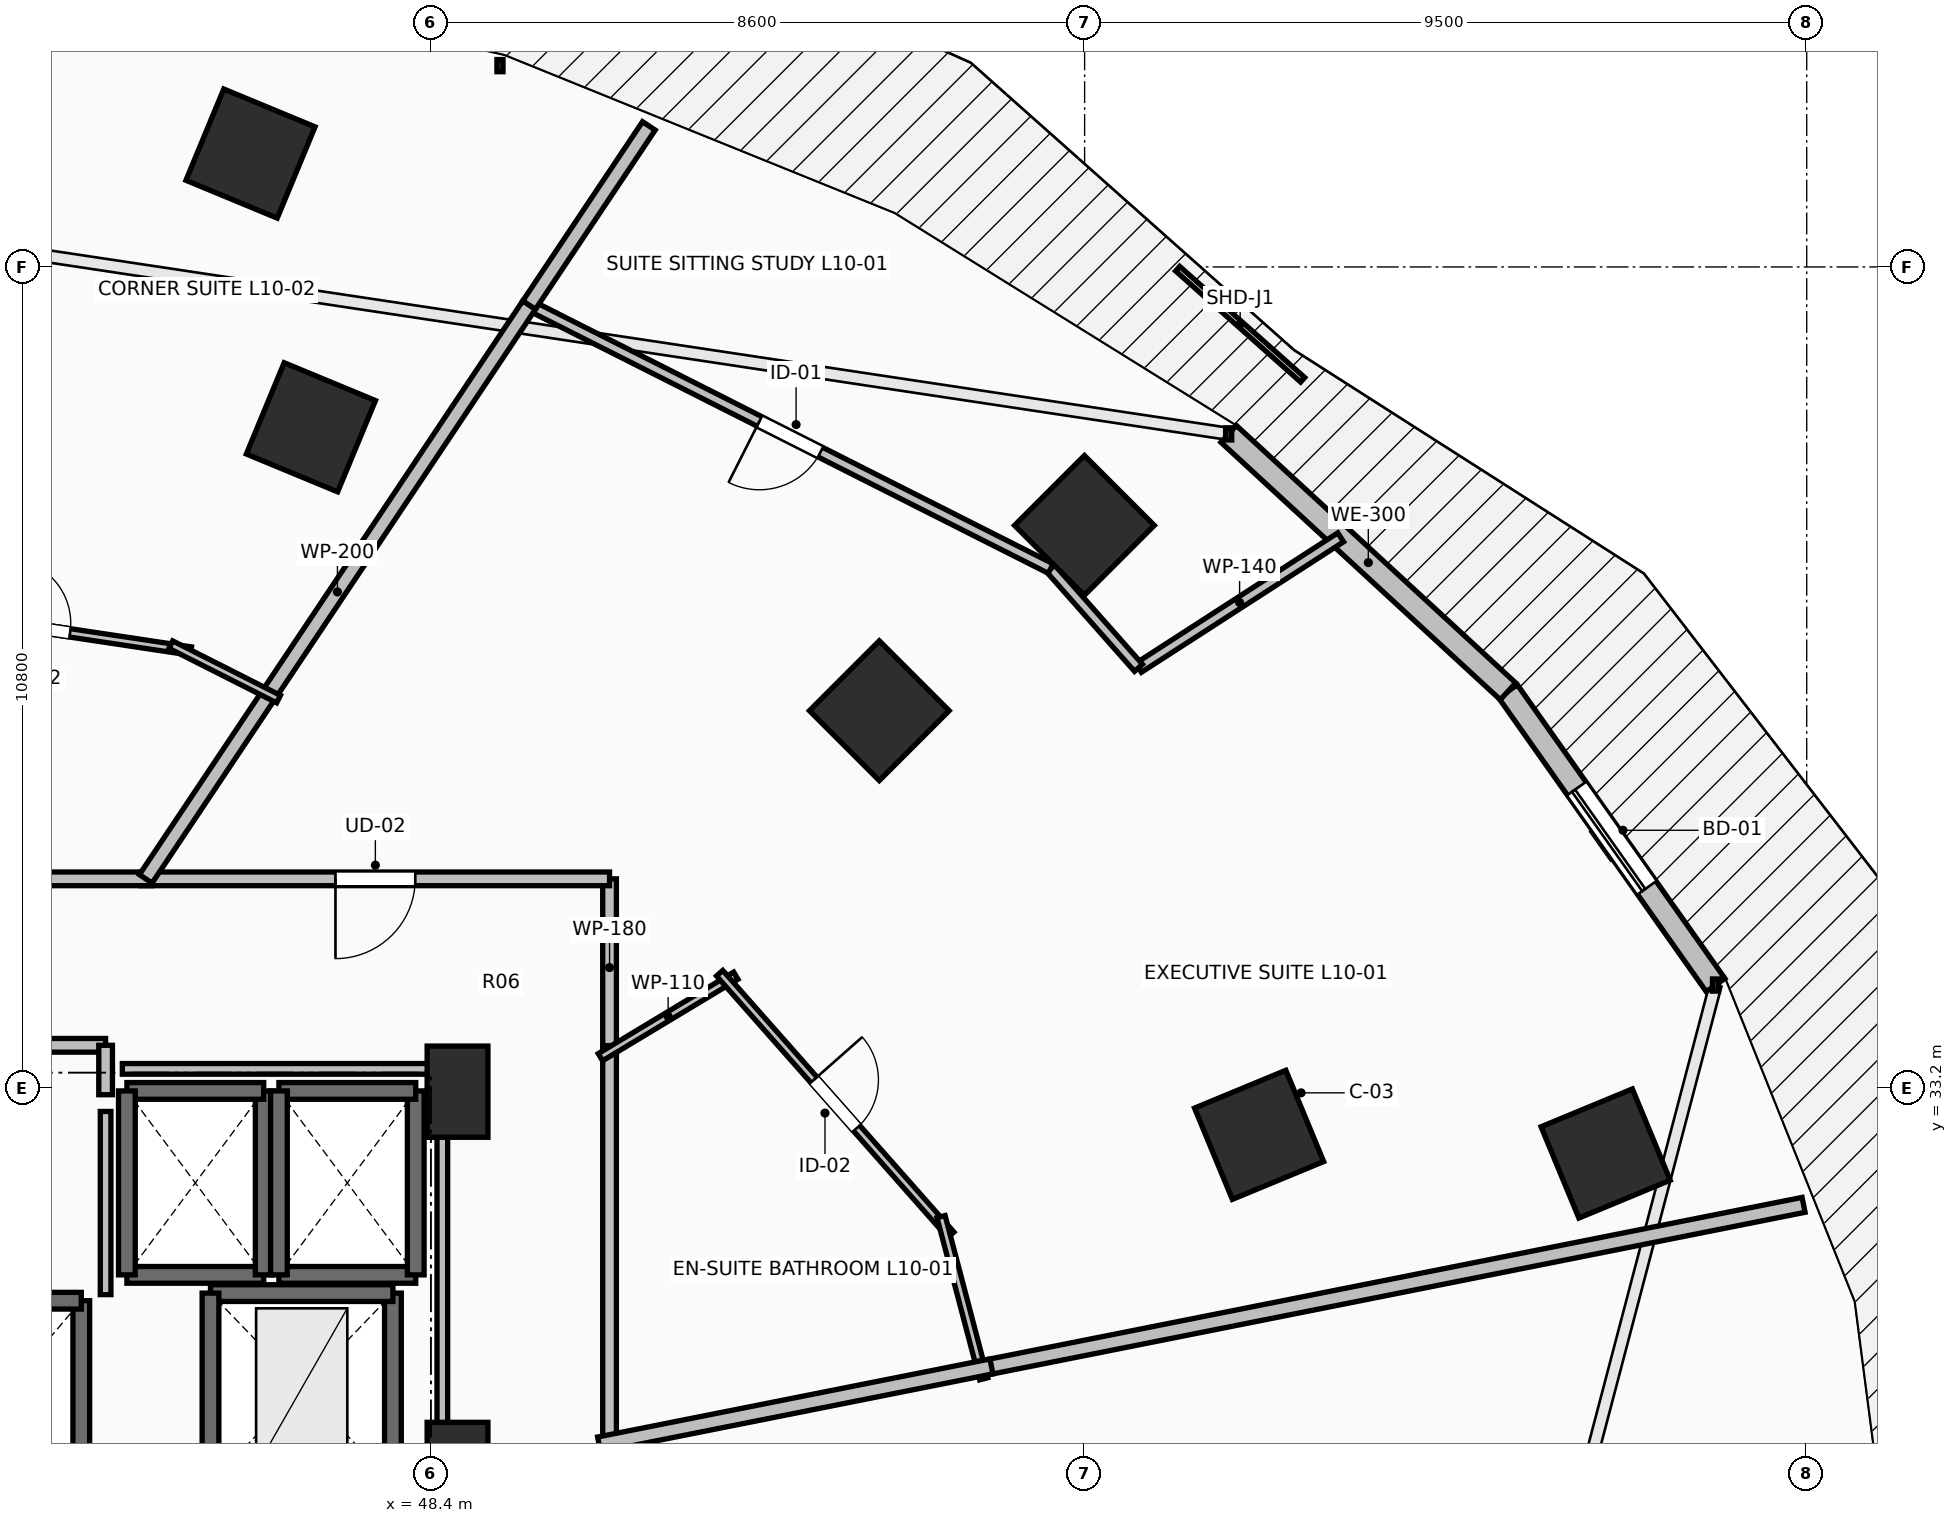
"""IFC4 building model, lengths in metres.
Left out: names, types, materials, properties, quantities, classifications, styles, units other than length and angle.
Written with IfcOpenShell. Run it as: python <this file> out.ifc"""

import sys

from ifc_helpers import new_model, si_unit, direction, frame, frame_2d, origin, origin_2d, place, context, subcontext, project, spatial, rectangle, extrude, element, fill, save


model = new_model("IFC4")
c1 = context("Model", 3, precision=1e-05, world=origin(), true_north=direction((0.0, 1.0)))
c2 = subcontext(c1, "Body", "Model", "MODEL_VIEW")
j1 = project(units=[si_unit("LENGTHUNIT", "METRE"), si_unit("PLANEANGLEUNIT", "RADIAN")], contexts=[c1])
p1 = place(None, origin())
s1 = spatial("IfcSite", under=j1, at=p1, CompositionType="ELEMENT")
p2 = place(p1, origin())
s2 = spatial("IfcBuilding", under=s1, at=p2, CompositionType="ELEMENT")
p3 = place(p2, frame((0.0, 0.0, 41.5)))
s3 = spatial("IfcBuildingStorey", under=s2, at=p3, CompositionType="ELEMENT", Elevation=41.5)
for number, where, z_axis, x_axis in (
    (1, (59.295, 32.582, 0.0), (0.0, 0.0, 1.0), (0.924, 0.383, 0.0)),
    (2, (54.299, 38.162, 0.0), (0.0, 0.0, 1.0), (0.707, 0.707, 0.0)),
    (3, (46.821, 41.891, 0.0), (0.0, 0.0, 1.0), (0.383, 0.924, 0.0)),
    (4, (63.854, 32.337, 0.0), (0.0, 0.0, 1.0), (0.924, 0.383, 0.0)),
    (5, (56.997, 40.6, 0.0), (0.0, 0.0, 1.0), (0.707, 0.707, 0.0)),
    (6, (46.026, 45.492, 0.0), (0.0, 0.0, 1.0), (0.383, 0.924, 0.0)),
):
    element("IfcColumn", number, at=place(p3, frame(where, z_axis=z_axis, x_axis=x_axis)), inside=s3, PredefinedType="COLUMN", context=c2, shape_type="SweptSolid", body=[
        extrude(rectangle(XDim=1.3, YDim=1.3, at=origin_2d()), origin(), (0.0, 0.0, 1.0), 3.5),
    ])
for number, where, z_axis, x_axis in (
    (7, (48.75, 33.15, 0.0), (0.0, 0.0, 1.0), (1.0, 0.0, 0.0)),
    (8, (48.75, 28.2, 0.0), (0.0, 0.0, 1.0), (1.0, 0.0, 0.0)),
):
    element("IfcColumn", number, at=place(p3, frame(where, z_axis=z_axis, x_axis=x_axis)), inside=s3, PredefinedType="PILASTER", context=c2, shape_type="SweptSolid", body=[
        extrude(rectangle(XDim=0.8, YDim=1.2, at=origin_2d()), origin(), (0.0, 0.0, 1.0), 3.5),
    ])
p4 = place(p3, frame((65.301, 34.553, 0.0), z_axis=(0.0, 0.0, 1.0), x_axis=(-0.577130815624, 0.816651713803, 0.0)))
e9 = element("IfcWall", 9, at=p4, inside=s3, PredefinedType="STANDARD", context=c2, shape_type="SweptSolid", body=[
    extrude(rectangle(XDim=4.731, YDim=0.3, at=frame_2d((2.366, 0.0))), origin(), (0.0, 0.0, 1.0), 3.24),
])
p5 = place(p4, frame((1.566, 0.0, 0.0)))
e10 = element("IfcOpeningElement", 10, at=p5, cuts=e9, PredefinedType="OPENING", context=c2, shape_type="SweptSolid", body=[
    extrude(rectangle(XDim=1.6, YDim=2.3, at=frame_2d((0.8, 1.15))), frame((0.0, 0.165, 0.0), z_axis=(0.0, -1.0, 0.0), x_axis=(1.0, 0.0, 0.0)), (0.0, 0.0, 1.0), 0.33),
])
p6 = place(p3, frame((62.57, 38.417, 0.0), z_axis=(0.0, 0.0, 1.0), x_axis=(-0.735342629635, 0.677695519419, 0.0)))
e11 = element("IfcWall", 11, at=p6, inside=s3, PredefinedType="STANDARD", context=c2, shape_type="SweptSolid", body=[
    extrude(rectangle(XDim=4.997, YDim=0.3, at=frame_2d((2.499, 0.0))), origin(), (0.0, 0.0, 1.0), 3.24),
])
p7 = place(p3, frame((43.8, 27.8, 0.0), z_axis=(0.0, 0.0, 1.0), x_axis=(0.0, 1.0, 0.0)))
e12 = element("IfcWall", 12, at=p7, inside=s3, PredefinedType="SOLIDWALL", context=c2, shape_type="SweptSolid", body=[
    extrude(rectangle(XDim=2.6, YDim=0.22, at=frame_2d((1.3, 0.0))), origin(), (0.0, 0.0, 1.0), 3.24),
])
p8 = place(p3, frame((43.8, 30.4, 0.0), z_axis=(0.0, 0.0, 1.0), x_axis=(-1.0, 0.0, 0.0)))
e13 = element("IfcWall", 13, at=p8, inside=s3, PredefinedType="SOLIDWALL", context=c2, shape_type="SweptSolid", body=[
    extrude(rectangle(XDim=2.2, YDim=0.22, at=frame_2d((1.1, 0.0))), origin(), (0.0, 0.0, 1.0), 3.24),
])
p9 = place(p3, frame((44.4, 30.74, 0.0), z_axis=(0.0, 0.0, 1.0), x_axis=(1.0, 0.0, 0.0)))
e14 = element("IfcWall", 14, at=p9, inside=s3, PredefinedType="SOLIDWALL", context=c2, shape_type="SweptSolid", body=[
    extrude(rectangle(XDim=1.8, YDim=0.22, at=frame_2d((0.9, 0.0))), origin(), (0.0, 0.0, 1.0), 3.24),
])
p10 = place(p3, frame((46.2, 30.74, 0.0), z_axis=(0.0, 0.0, 1.0), x_axis=(0.0, 1.0, 0.0)))
e15 = element("IfcWall", 15, at=p10, inside=s3, PredefinedType="SOLIDWALL", context=c2, shape_type="SweptSolid", body=[
    extrude(rectangle(XDim=2.42, YDim=0.22, at=frame_2d((1.21, 0.0))), origin(), (0.0, 0.0, 1.0), 3.24),
])
p11 = place(p3, frame((46.2, 33.16, 0.0), z_axis=(0.0, 0.0, 1.0), x_axis=(-1.0, 0.0, 0.0)))
e16 = element("IfcWall", 16, at=p11, inside=s3, PredefinedType="SOLIDWALL", context=c2, shape_type="SweptSolid", body=[
    extrude(rectangle(XDim=1.8, YDim=0.22, at=frame_2d((0.9, 0.0))), origin(), (0.0, 0.0, 1.0), 3.24),
])
p12 = place(p3, frame((44.4, 33.16, 0.0), z_axis=(0.0, 0.0, 1.0), x_axis=(0.0, -1.0, 0.0)))
e17 = element("IfcWall", 17, at=p12, inside=s3, PredefinedType="SOLIDWALL", context=c2, shape_type="SweptSolid", body=[
    extrude(rectangle(XDim=2.42, YDim=0.22, at=frame_2d((1.21, 0.0))), origin(), (0.0, 0.0, 1.0), 3.24),
])
p13 = place(p3, frame((46.4, 30.74, 0.0), z_axis=(0.0, 0.0, 1.0), x_axis=(1.0, 0.0, 0.0)))
e18 = element("IfcWall", 18, at=p13, inside=s3, PredefinedType="SOLIDWALL", context=c2, shape_type="SweptSolid", body=[
    extrude(rectangle(XDim=1.8, YDim=0.22, at=frame_2d((0.9, 0.0))), origin(), (0.0, 0.0, 1.0), 3.24),
])
p14 = place(p3, frame((48.2, 30.74, 0.0), z_axis=(0.0, 0.0, 1.0), x_axis=(0.0, 1.0, 0.0)))
e19 = element("IfcWall", 19, at=p14, inside=s3, PredefinedType="SOLIDWALL", context=c2, shape_type="SweptSolid", body=[
    extrude(rectangle(XDim=2.42, YDim=0.22, at=frame_2d((1.21, 0.0))), origin(), (0.0, 0.0, 1.0), 3.24),
])
p15 = place(p3, frame((48.2, 33.16, 0.0), z_axis=(0.0, 0.0, 1.0), x_axis=(-1.0, 0.0, 0.0)))
e20 = element("IfcWall", 20, at=p15, inside=s3, PredefinedType="SOLIDWALL", context=c2, shape_type="SweptSolid", body=[
    extrude(rectangle(XDim=1.8, YDim=0.22, at=frame_2d((0.9, 0.0))), origin(), (0.0, 0.0, 1.0), 3.24),
])
p16 = place(p3, frame((46.4, 33.16, 0.0), z_axis=(0.0, 0.0, 1.0), x_axis=(0.0, -1.0, 0.0)))
e21 = element("IfcWall", 21, at=p16, inside=s3, PredefinedType="SOLIDWALL", context=c2, shape_type="SweptSolid", body=[
    extrude(rectangle(XDim=2.42, YDim=0.22, at=frame_2d((1.21, 0.0))), origin(), (0.0, 0.0, 1.0), 3.24),
])
p17 = place(p3, frame((47.9, 28.0, 0.0), z_axis=(0.0, 0.0, 1.0), x_axis=(0.0, 1.0, 0.0)))
e22 = element("IfcWall", 22, at=p17, inside=s3, PredefinedType="SHEAR", context=c2, shape_type="SweptSolid", body=[
    extrude(rectangle(XDim=2.5, YDim=0.22, at=frame_2d((1.25, 0.0))), origin(), (0.0, 0.0, 1.0), 3.24),
])
p18 = place(p3, frame((47.9, 30.5, 0.0), z_axis=(0.0, 0.0, 1.0), x_axis=(-1.0, 0.0, 0.0)))
e23 = element("IfcWall", 23, at=p18, inside=s3, PredefinedType="SHEAR", context=c2, shape_type="SweptSolid", body=[
    extrude(rectangle(XDim=2.4, YDim=0.22, at=frame_2d((1.2, 0.0))), origin(), (0.0, 0.0, 1.0), 3.24),
])
p19 = place(p3, frame((45.5, 30.5, 0.0), z_axis=(0.0, 0.0, 1.0), x_axis=(0.0, -1.0, 0.0)))
e24 = element("IfcWall", 24, at=p19, inside=s3, PredefinedType="SHEAR", context=c2, shape_type="SweptSolid", body=[
    extrude(rectangle(XDim=2.5, YDim=0.22, at=frame_2d((1.25, 0.0))), origin(), (0.0, 0.0, 1.0), 3.24),
])
p20 = place(p3, frame((44.12, 33.76, 0.0), z_axis=(0.0, 0.0, 1.0), x_axis=(-1.0, 0.0, 0.0)))
e25 = element("IfcWall", 25, at=p20, inside=s3, PredefinedType="PARTITIONING", context=c2, shape_type="SweptSolid", body=[
    extrude(rectangle(XDim=2.53, YDim=0.18, at=frame_2d((1.265, 0.0))), origin(), (0.0, 0.0, 1.0), 3.24),
])
p21 = place(p20, frame((0.84, 0.0, 0.0)))
e26 = element("IfcOpeningElement", 26, at=p21, cuts=e25, PredefinedType="OPENING", context=c2, shape_type="SweptSolid", body=[
    extrude(rectangle(XDim=0.85, YDim=2.1, at=frame_2d((0.425, 1.05))), frame((0.0, 0.105, 0.0), z_axis=(0.0, -1.0, 0.0), x_axis=(1.0, 0.0, 0.0)), (0.0, 0.0, 1.0), 0.21),
])
p22 = place(p3, frame((44.12, 33.11, 0.0), z_axis=(0.0, 0.0, 1.0), x_axis=(0.0, 1.0, 0.0)))
e27 = element("IfcWall", 27, at=p22, inside=s3, PredefinedType="PARTITIONING", context=c2, shape_type="SweptSolid", body=[
    extrude(rectangle(XDim=0.65, YDim=0.18, at=frame_2d((0.325, 0.0))), origin(), (0.0, 0.0, 1.0), 3.24),
])
p23 = place(p3, frame((50.75, 33.616, 0.0), z_axis=(0.0, 0.0, 1.0), x_axis=(0.0, 1.0, 0.0)))
e28 = element("IfcWall", 28, at=p23, inside=s3, PredefinedType="PARTITIONING", context=c2, shape_type="SweptSolid", body=[
    extrude(rectangle(XDim=2.334, YDim=0.18, at=frame_2d((1.167, 0.0))), origin(), (0.0, 0.0, 1.0), 2.432),
])
p24 = place(p3, frame((50.75, 35.95, 0.0), z_axis=(0.0, 0.0, 1.0), x_axis=(-1.0, 0.0, 0.0)))
e29 = element("IfcWall", 29, at=p24, inside=s3, PredefinedType="PARTITIONING", context=c2, shape_type="SweptSolid", body=[
    extrude(rectangle(XDim=6.162, YDim=0.18, at=frame_2d((3.081, 0.0))), origin(), (0.0, 0.0, 1.0), 2.432),
])
p25 = place(p24, frame((2.556, 0.0, 0.0)))
e30 = element("IfcOpeningElement", 30, at=p25, cuts=e29, PredefinedType="OPENING", context=c2, shape_type="SweptSolid", body=[
    extrude(rectangle(XDim=1.05, YDim=2.2, at=frame_2d((0.525, 1.1))), frame((0.0, 0.105, 0.0), z_axis=(0.0, -1.0, 0.0), x_axis=(1.0, 0.0, 0.0)), (0.0, 0.0, 1.0), 0.21),
])
p26 = place(p3, frame((50.75, 28.336, 0.0), z_axis=(0.0, 0.0, 1.0), x_axis=(0.0, 1.0, 0.0)))
e31 = element("IfcWall", 31, at=p26, inside=s3, PredefinedType="PARTITIONING", context=c2, shape_type="SweptSolid", body=[
    extrude(rectangle(XDim=5.42, YDim=0.18, at=frame_2d((2.71, 0.0))), origin(), (0.0, 0.0, 1.0), 2.432),
])
p27 = place(p3, frame((44.728, 35.95, 0.0), z_axis=(0.0, 0.0, 1.0), x_axis=(-1.0, 0.0, 0.0)))
e32 = element("IfcWall", 32, at=p27, inside=s3, PredefinedType="PARTITIONING", context=c2, shape_type="SweptSolid", body=[
    extrude(rectangle(XDim=4.334, YDim=0.18, at=frame_2d((2.167, 0.0))), origin(), (0.0, 0.0, 1.0), 3.24),
])
p28 = place(p3, frame((50.63, 33.604, 0.0), z_axis=(0.0, 0.0, 1.0), x_axis=(0.856631627837, 0.515928535932, 0.0)))
e33 = element("IfcWall", 33, at=p28, inside=s3, PredefinedType="PARTITIONING", context=c2, shape_type="SweptSolid", body=[
    extrude(rectangle(XDim=2.079, YDim=0.11, at=frame_2d((1.04, 0.0))), origin(), (0.0, 0.0, 1.0), 3.24),
])
p29 = place(p3, frame((52.198, 34.709, 0.0), z_axis=(0.0, 0.0, 1.0), x_axis=(0.662071486681, -0.74944068913, 0.0)))
e34 = element("IfcWall", 34, at=p29, inside=s3, PredefinedType="PARTITIONING", context=c2, shape_type="SweptSolid", body=[
    extrude(rectangle(XDim=4.594, YDim=0.11, at=frame_2d((2.297, 0.0))), origin(), (0.0, 0.0, 1.0), 2.432),
])
p30 = place(p29, frame((1.872, 0.0, 0.0)))
e35 = element("IfcOpeningElement", 35, at=p30, cuts=e34, PredefinedType="OPENING", context=c2, shape_type="SweptSolid", body=[
    extrude(rectangle(XDim=0.85, YDim=2.1, at=frame_2d((0.425, 1.05))), frame((0.0, 0.07, 0.0), z_axis=(0.0, -1.0, 0.0), x_axis=(1.0, 0.0, 0.0)), (0.0, 0.0, 1.0), 0.14),
])
p31 = place(p3, frame((55.111, 31.506, 0.0), z_axis=(0.0, 0.0, 1.0), x_axis=(0.254389812051, -0.967101764823, 0.0)))
e36 = element("IfcWall", 36, at=p31, inside=s3, PredefinedType="PARTITIONING", context=c2, shape_type="SweptSolid", body=[
    extrude(rectangle(XDim=2.206, YDim=0.11, at=frame_2d((1.103, 0.0))), origin(), (0.0, 0.0, 1.0), 3.24),
])
p32 = place(p3, frame((60.369, 40.443, 0.0), z_axis=(0.0, 0.0, 1.0), x_axis=(-0.840157237287, -0.542342895809, 0.0)))
e37 = element("IfcWall", 37, at=p32, inside=s3, PredefinedType="PARTITIONING", context=c2, shape_type="SweptSolid", body=[
    extrude(rectangle(XDim=3.166, YDim=0.14, at=frame_2d((1.583, 0.0))), origin(), (0.0, 0.0, 1.0), 2.624),
])
p33 = place(p3, frame((57.709, 38.726, 0.0), z_axis=(0.0, 0.0, 1.0), x_axis=(-0.662510427818, 0.749052690425, 0.0)))
e38 = element("IfcWall", 38, at=p33, inside=s3, PredefinedType="PARTITIONING", context=c2, shape_type="SweptSolid", body=[
    extrude(rectangle(XDim=1.743, YDim=0.14, at=frame_2d((0.872, 0.0))), origin(), (0.0, 0.0, 1.0), 2.432),
])
p34 = place(p3, frame((56.554, 40.032, 0.0), z_axis=(0.0, 0.0, 1.0), x_axis=(-0.892545780062, 0.450956794487, 0.0)))
e39 = element("IfcWall", 39, at=p34, inside=s3, PredefinedType="PARTITIONING", context=c2, shape_type="SweptSolid", body=[
    extrude(rectangle(XDim=7.688, YDim=0.14, at=frame_2d((3.844, 0.0))), origin(), (0.0, 0.0, 1.0), 2.432),
])
p35 = place(p34, frame((3.394, 0.0, 0.0)))
e40 = element("IfcOpeningElement", 40, at=p35, cuts=e39, PredefinedType="OPENING", context=c2, shape_type="SweptSolid", body=[
    extrude(rectangle(XDim=0.9, YDim=2.1, at=frame_2d((0.45, 1.05))), frame((0.0, 0.085, 0.0), z_axis=(0.0, -1.0, 0.0), x_axis=(1.0, 0.0, 0.0)), (0.0, 0.0, 1.0), 0.17),
])
p36 = place(p3, frame((49.692, 43.499, 0.0), z_axis=(0.0, 0.0, 1.0), x_axis=(-0.555556259167, -0.831478949163, 0.0)))
e41 = element("IfcWall", 41, at=p36, inside=s3, PredefinedType="PARTITIONING", context=c2, shape_type="SweptSolid", body=[
    extrude(rectangle(XDim=9.079, YDim=0.2, at=frame_2d((4.54, 0.0))), origin(), (0.0, 0.0, 1.0), 2.432),
])
p37 = place(p3, frame((55.637, 29.508, 0.0), z_axis=(0.0, 0.0, 1.0), x_axis=(0.980781844691, 0.195107593712, 0.0)))
e42 = element("IfcWall", 42, at=p37, inside=s3, PredefinedType="PARTITIONING", context=c2, shape_type="SweptSolid", body=[
    extrude(rectangle(XDim=11.034, YDim=0.2, at=frame_2d((5.517, 0.0))), origin(), (0.0, 0.0, 1.0), 2.624),
])
p38 = place(p3, frame((50.613, 28.509, 0.0), z_axis=(0.0, 0.0, 1.0), x_axis=(0.980788877604, 0.195072236795, 0.0)))
e43 = element("IfcWall", 43, at=p38, inside=s3, PredefinedType="PARTITIONING", context=c2, shape_type="SweptSolid", body=[
    extrude(rectangle(XDim=5.263, YDim=0.2, at=frame_2d((2.631, 0.0))), origin(), (0.0, 0.0, 1.0), 2.972),
])
p39 = place(p3, frame((51.267, 45.856, 0.0), z_axis=(0.0, 0.0, 1.0), x_axis=(-0.555653789226, -0.831413775757, 0.0)))
e44 = element("IfcWall", 44, at=p39, inside=s3, PredefinedType="PARTITIONING", context=c2, shape_type="SweptSolid", body=[
    extrude(rectangle(XDim=2.835, YDim=0.2, at=frame_2d((1.417, 0.0))), origin(), (0.0, 0.0, 1.0), 2.624),
])
p40 = place(p3, frame((41.223, 39.551, 0.0), z_axis=(0.0, 0.0, 1.0), x_axis=(0.988911221338, -0.148507899833, 0.0)))
e45 = element("IfcWall", 45, at=p40, inside=s3, PredefinedType="PARTITIONING", context=c2, shape_type="SweptSolid", body=[
    extrude(rectangle(XDim=4.064, YDim=0.11, at=frame_2d((2.032, 0.0))), origin(), (0.0, 0.0, 1.0), 3.24),
])
p41 = place(p40, frame((1.607, 0.0, 0.0)))
e46 = element("IfcOpeningElement", 46, at=p41, cuts=e45, PredefinedType="OPENING", context=c2, shape_type="SweptSolid", body=[
    extrude(rectangle(XDim=0.85, YDim=2.1, at=frame_2d((0.425, 1.05))), frame((0.0, 0.07, 0.0), z_axis=(0.0, -1.0, 0.0), x_axis=(1.0, 0.0, 0.0)), (0.0, 0.0, 1.0), 0.14),
])
p42 = place(p3, frame((44.978, 39.031, 0.0), z_axis=(0.0, 0.0, 1.0), x_axis=(0.892388427115, -0.451268096758, 0.0)))
e47 = element("IfcWall", 47, at=p42, inside=s3, PredefinedType="PARTITIONING", context=c2, shape_type="SweptSolid", body=[
    extrude(rectangle(XDim=1.588, YDim=0.11, at=frame_2d((0.794, 0.0))), origin(), (0.0, 0.0, 1.0), 3.24),
])
p43 = place(p3, frame((44.12, 30.48, 0.0), z_axis=(0.0, 0.0, 1.0), x_axis=(0.0, 1.0, 0.0)))
e48 = element("IfcWall", 48, at=p43, inside=s3, PredefinedType="PARTITIONING", context=c2, shape_type="SweptSolid", body=[
    extrude(rectangle(XDim=2.41, YDim=0.14, at=frame_2d((1.205, 0.0))), origin(), (0.0, 0.0, 1.0), 3.24),
])
p44 = place(p3, frame((44.34, 33.45, 0.0), z_axis=(0.0, 0.0, 1.0), x_axis=(1.0, 0.0, 0.0)))
e49 = element("IfcWall", 49, at=p44, inside=s3, PredefinedType="PARTITIONING", context=c2, shape_type="SweptSolid", body=[
    extrude(rectangle(XDim=4.21, YDim=0.14, at=frame_2d((2.105, 0.0))), origin(), (0.0, 0.0, 1.0), 2.432),
])
p45 = place(p3, frame((48.55, 33.45, 0.0), z_axis=(0.0, 0.0, 1.0), x_axis=(0.0, -1.0, 0.0)))
e50 = element("IfcWall", 50, at=p45, inside=s3, PredefinedType="PARTITIONING", context=c2, shape_type="SweptSolid", body=[
    extrude(rectangle(XDim=5.254, YDim=0.14, at=frame_2d((2.627, 0.0))), origin(), (0.0, 0.0, 1.0), 2.432),
])
p46 = place(p5, origin())
e51 = element("IfcDoor", 51, at=p46, inside=s3, OperationType="SLIDING_TO_LEFT", PredefinedType="DOOR", context=c2, shape_type="SweptSolid", body=[
    extrude(rectangle(XDim=1.6, YDim=2.3, at=frame_2d((0.8, 1.15))), frame((0.0, 0.025, 0.0), z_axis=(0.0, -1.0, 0.0), x_axis=(1.0, 0.0, 0.0)), (0.0, 0.0, 1.0), 0.05),
])
fill(e10, e51)
p47 = place(p25, origin())
e52 = element("IfcDoor", 52, at=p47, inside=s3, OperationType="SINGLE_SWING_RIGHT", PredefinedType="DOOR", context=c2, shape_type="SweptSolid", body=[
    extrude(rectangle(XDim=1.05, YDim=2.2, at=frame_2d((0.525, 1.1))), frame((0.0, 0.025, 0.0), z_axis=(0.0, -1.0, 0.0), x_axis=(1.0, 0.0, 0.0)), (0.0, 0.0, 1.0), 0.05),
])
fill(e30, e52)
p48 = place(p30, origin())
e53 = element("IfcDoor", 53, at=p48, inside=s3, OperationType="SINGLE_SWING_LEFT", PredefinedType="DOOR", context=c2, shape_type="SweptSolid", body=[
    extrude(rectangle(XDim=0.85, YDim=2.1, at=frame_2d((0.425, 1.05))), frame((0.0, 0.025, 0.0), z_axis=(0.0, -1.0, 0.0), x_axis=(1.0, 0.0, 0.0)), (0.0, 0.0, 1.0), 0.05),
])
fill(e35, e53)
p49 = place(p35, origin())
e54 = element("IfcDoor", 54, at=p49, inside=s3, OperationType="SINGLE_SWING_RIGHT", PredefinedType="DOOR", context=c2, shape_type="SweptSolid", body=[
    extrude(rectangle(XDim=0.9, YDim=2.1, at=frame_2d((0.45, 1.05))), frame((0.0, 0.025, 0.0), z_axis=(0.0, -1.0, 0.0), x_axis=(1.0, 0.0, 0.0)), (0.0, 0.0, 1.0), 0.05),
])
fill(e40, e54)
p50 = place(p41, origin())
e55 = element("IfcDoor", 55, at=p50, inside=s3, OperationType="SINGLE_SWING_LEFT", PredefinedType="DOOR", context=c2, shape_type="SweptSolid", body=[
    extrude(rectangle(XDim=0.85, YDim=2.1, at=frame_2d((0.425, 1.05))), frame((0.0, 0.025, 0.0), z_axis=(0.0, -1.0, 0.0), x_axis=(1.0, 0.0, 0.0)), (0.0, 0.0, 1.0), 0.05),
])
fill(e46, e55)
save(model, sys.argv[1])
